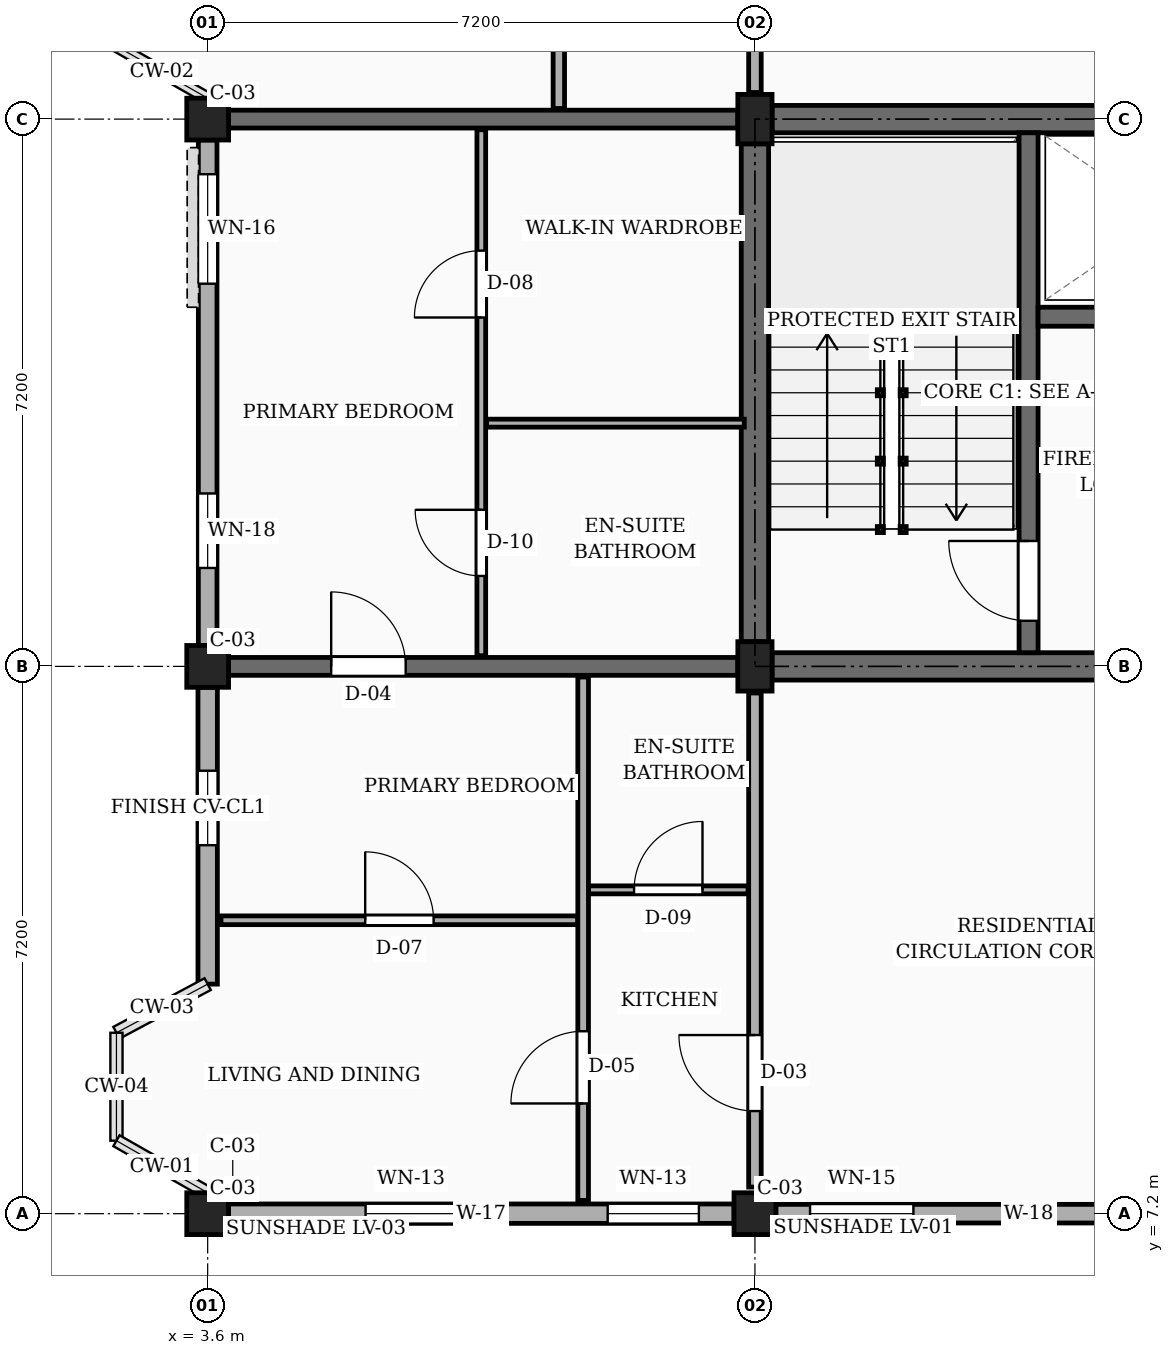
"""IFC4 building model, lengths in metres.
Left out: names, types, materials, properties, quantities, classifications, styles, units other than length and angle.
Written with IfcOpenShell. Run it as: python <this file> out.ifc"""

import sys

from ifc_helpers import new_model, si_unit, direction, frame, frame_2d, origin, origin_2d, place, context, subcontext, project, spatial, rectangle, extrude, element, fill, save


model = new_model("IFC4")
c1 = context("Model", 3, precision=1e-05, world=origin(), true_north=direction((0.0, 1.0)))
c2 = subcontext(c1, "Body", "Model", "MODEL_VIEW")
j1 = project(units=[si_unit("LENGTHUNIT", "METRE"), si_unit("PLANEANGLEUNIT", "RADIAN")], contexts=[c1])
p1 = place(None, origin())
s1 = spatial("IfcSite", under=j1, at=p1, CompositionType="ELEMENT")
p2 = place(p1, origin())
s2 = spatial("IfcBuilding", under=s1, at=p2, CompositionType="ELEMENT")
p3 = place(p2, frame((0.0, 0.0, 17.1)))
s3 = spatial("IfcBuildingStorey", under=s2, at=p3, CompositionType="ELEMENT", Elevation=17.1)
for number, where, z_axis, x_axis in (
    (1, (3.6, 7.2, 0.0), (0.0, 0.0, 1.0), (1.0, 0.0, 0.0)),
    (2, (3.6, 14.4, 0.0), (0.0, 0.0, 1.0), (1.0, 0.0, 0.0)),
    (3, (3.6, 21.6, 0.0), (0.0, 0.0, 1.0), (1.0, 0.0, 0.0)),
    (4, (10.8, 7.2, 0.0), (0.0, 0.0, 1.0), (1.0, 0.0, 0.0)),
):
    element("IfcColumn", number, at=place(p3, frame(where, z_axis=z_axis, x_axis=x_axis)), inside=s3, PredefinedType="COLUMN", context=c2, shape_type="SweptSolid", body=[
        extrude(rectangle(XDim=0.55, YDim=0.55, at=origin_2d()), origin(), (0.0, 0.0, 1.0), 3.15),
    ])
for number, where, z_axis, x_axis in (
    (5, (10.8, 14.4, 0.0), (0.0, 0.0, 1.0), (1.0, 0.0, 0.0)),
    (6, (10.8, 21.6, 0.0), (0.0, 0.0, 1.0), (1.0, 0.0, 0.0)),
):
    element("IfcColumn", number, at=place(p3, frame(where, z_axis=z_axis, x_axis=x_axis)), inside=s3, PredefinedType="COLUMN", context=c2, shape_type="SweptSolid", body=[
        extrude(rectangle(XDim=0.45, YDim=0.65, at=origin_2d()), origin(), (0.0, 0.0, 1.0), 3.15),
    ])
p4 = place(p3, frame((3.875, 14.4, 0.0), z_axis=(0.0, 0.0, 1.0), x_axis=(1.0, 0.0, 0.0)))
e7 = element("IfcWall", 7, at=p4, inside=s3, PredefinedType="SOLIDWALL", context=c2, shape_type="SweptSolid", body=[
    extrude(rectangle(XDim=6.7, YDim=0.235, at=frame_2d((3.35, 0.0))), origin(), (0.0, 0.0, 1.0), 2.17),
])
p5 = place(p4, frame((1.35, 0.0, 0.0)))
e8 = element("IfcOpeningElement", 8, at=p5, cuts=e7, PredefinedType="OPENING", context=c2, shape_type="SweptSolid", body=[
    extrude(rectangle(XDim=0.98, YDim=2.12, at=frame_2d((0.49, 1.06))), frame((0.0, 0.127, 0.0), z_axis=(0.0, -1.0, 0.0), x_axis=(1.0, 0.0, 0.0)), (0.0, 0.0, 1.0), 0.255),
])
p6 = place(p3, frame((3.875, 21.6, 0.0), z_axis=(0.0, 0.0, 1.0), x_axis=(1.0, 0.0, 0.0)))
e9 = element("IfcWall", 9, at=p6, inside=s3, PredefinedType="SOLIDWALL", context=c2, shape_type="SweptSolid", body=[
    extrude(rectangle(XDim=6.7, YDim=0.235, at=frame_2d((3.35, 0.0))), origin(), (0.0, 0.0, 1.0), 2.17),
])
p7 = place(p3, frame((3.875, 7.2, 0.0), z_axis=(0.0, 0.0, 1.0), x_axis=(1.0, 0.0, 0.0)))
e10 = element("IfcWall", 10, at=p7, inside=s3, PredefinedType="SOLIDWALL", context=c2, shape_type="SweptSolid", body=[
    extrude(rectangle(XDim=6.65, YDim=0.255, at=frame_2d((3.325, 0.0))), origin(), (0.0, 0.0, 1.0), 2.44),
])
p8 = place(p7, frame((1.802, 0.0, 0.78)))
e11 = element("IfcOpeningElement", 11, at=p8, cuts=e10, PredefinedType="OPENING", context=c2, shape_type="SweptSolid", body=[
    extrude(rectangle(XDim=1.2, YDim=1.26, at=frame_2d((0.6, 0.63))), frame((0.0, 0.137, 0.0), z_axis=(0.0, -1.0, 0.0), x_axis=(1.0, 0.0, 0.0)), (0.0, 0.0, 1.0), 0.275),
])
p9 = place(p7, frame((4.988, 0.0, 0.78)))
e12 = element("IfcOpeningElement", 12, at=p9, cuts=e10, PredefinedType="OPENING", context=c2, shape_type="SweptSolid", body=[
    extrude(rectangle(XDim=1.2, YDim=1.26, at=frame_2d((0.6, 0.63))), frame((0.0, 0.137, 0.0), z_axis=(0.0, -1.0, 0.0), x_axis=(1.0, 0.0, 0.0)), (0.0, 0.0, 1.0), 0.275),
])
p10 = place(p3, frame((11.075, 7.2, 0.0), z_axis=(0.0, 0.0, 1.0), x_axis=(1.0, 0.0, 0.0)))
e13 = element("IfcWall", 13, at=p10, inside=s3, PredefinedType="SOLIDWALL", context=c2, shape_type="SweptSolid", body=[
    extrude(rectangle(XDim=6.65, YDim=0.245, at=frame_2d((3.325, 0.0))), origin(), (0.0, 0.0, 1.0), 2.44),
])
p11 = place(p10, frame((0.45, 0.0, 0.78)))
e14 = element("IfcOpeningElement", 14, at=p11, cuts=e13, PredefinedType="OPENING", context=c2, shape_type="SweptSolid", body=[
    extrude(rectangle(XDim=1.36, YDim=1.26, at=frame_2d((0.68, 0.63))), frame((0.0, 0.133, 0.0), z_axis=(0.0, -1.0, 0.0), x_axis=(1.0, 0.0, 0.0)), (0.0, 0.0, 1.0), 0.265),
])
p12 = place(p10, frame((4.65, 0.0, 0.78)))
e15 = element("IfcOpeningElement", 15, at=p12, cuts=e13, PredefinedType="OPENING", context=c2, shape_type="SweptSolid", body=[
    extrude(rectangle(XDim=0.9, YDim=1.36, at=frame_2d((0.45, 0.68))), frame((0.0, 0.133, 0.0), z_axis=(0.0, -1.0, 0.0), x_axis=(1.0, 0.0, 0.0)), (0.0, 0.0, 1.0), 0.265),
])
p13 = place(p3, frame((3.6, 21.325, 0.0), z_axis=(0.0, 0.0, 1.0), x_axis=(0.0, -1.0, 0.0)))
e16 = element("IfcWall", 16, at=p13, inside=s3, PredefinedType="SOLIDWALL", context=c2, shape_type="SweptSolid", body=[
    extrude(rectangle(XDim=6.65, YDim=0.245, at=frame_2d((3.325, 0.0))), origin(), (0.0, 0.0, 1.0), 2.44),
])
p14 = place(p13, frame((0.45, 0.0, 0.78)))
e17 = element("IfcOpeningElement", 17, at=p14, cuts=e16, PredefinedType="OPENING", context=c2, shape_type="SweptSolid", body=[
    extrude(rectangle(XDim=1.44, YDim=1.26, at=frame_2d((0.72, 0.63))), frame((0.0, 0.133, 0.0), z_axis=(0.0, -1.0, 0.0), x_axis=(1.0, 0.0, 0.0)), (0.0, 0.0, 1.0), 0.265),
])
p15 = place(p13, frame((4.65, 0.0, 0.78)))
e18 = element("IfcOpeningElement", 18, at=p15, cuts=e16, PredefinedType="OPENING", context=c2, shape_type="SweptSolid", body=[
    extrude(rectangle(XDim=0.98, YDim=1.36, at=frame_2d((0.49, 0.68))), frame((0.0, 0.133, 0.0), z_axis=(0.0, -1.0, 0.0), x_axis=(1.0, 0.0, 0.0)), (0.0, 0.0, 1.0), 0.265),
])
p16 = place(p3, frame((3.6, 14.125, 0.0), z_axis=(0.0, 0.0, 1.0), x_axis=(0.0, -1.0, 0.0)))
e19 = element("IfcWall", 19, at=p16, inside=s3, PredefinedType="SOLIDWALL", context=c2, shape_type="SweptSolid", body=[
    extrude(rectangle(XDim=3.905, YDim=0.255, at=frame_2d((1.953, 0.0))), origin(), (0.0, 0.0, 1.0), 2.44),
])
p17 = place(p16, frame((1.097, 0.0, 0.78)))
e20 = element("IfcOpeningElement", 20, at=p17, cuts=e19, PredefinedType="OPENING", context=c2, shape_type="SweptSolid", body=[
    extrude(rectangle(XDim=0.98, YDim=1.36, at=frame_2d((0.49, 0.68))), frame((0.0, 0.137, 0.0), z_axis=(0.0, -1.0, 0.0), x_axis=(1.0, 0.0, 0.0)), (0.0, 0.0, 1.0), 0.275),
])
p18 = place(p3, frame((10.8, 14.725, 0.0), z_axis=(0.0, 0.0, 1.0), x_axis=(0.0, 1.0, 0.0)))
e21 = element("IfcWall", 21, at=p18, inside=s3, PredefinedType="SHEAR", context=c2, shape_type="SweptSolid", body=[
    extrude(rectangle(XDim=6.55, YDim=0.36, at=frame_2d((3.275, 0.0))), origin(), (0.0, 0.0, 1.0), 2.87),
])
for number, where, z_axis, x_axis in (
    (22, (11.025, 21.6, 0.0), (0.0, 0.0, 1.0), (1.0, 0.0, 0.0)),
    (23, (11.025, 14.4, 0.0), (0.0, 0.0, 1.0), (1.0, 0.0, 0.0)),
):
    element("IfcWall", number, at=place(p3, frame(where, z_axis=z_axis, x_axis=x_axis)), inside=s3, PredefinedType="SHEAR", context=c2, shape_type="SweptSolid", body=[
        extrude(rectangle(XDim=6.75, YDim=0.36, at=frame_2d((3.375, 0.0))), origin(), (0.0, 0.0, 1.0), 2.87),
    ])
p19 = place(p3, frame((14.4, 14.58, 0.0), z_axis=(0.0, 0.0, 1.0), x_axis=(0.0, 1.0, 0.0)))
e24 = element("IfcWall", 24, at=p19, inside=s3, PredefinedType="SHEAR", context=c2, shape_type="SweptSolid", body=[
    extrude(rectangle(XDim=6.84, YDim=0.25, at=frame_2d((3.42, 0.0))), origin(), (0.0, 0.0, 1.0), 2.87),
])
p20 = place(p19, frame((0.42, 0.0, 0.0)))
e25 = element("IfcOpeningElement", 25, at=p20, cuts=e24, PredefinedType="OPENING", context=c2, shape_type="SweptSolid", body=[
    extrude(rectangle(XDim=1.05, YDim=2.15, at=frame_2d((0.525, 1.075))), frame((0.0, 0.135, 0.0), z_axis=(0.0, -1.0, 0.0), x_axis=(1.0, 0.0, 0.0)), (0.0, 0.0, 1.0), 0.27),
])
p21 = place(p3, frame((14.525, 19.0, 0.0), z_axis=(0.0, 0.0, 1.0), x_axis=(1.0, 0.0, 0.0)))
e26 = element("IfcWall", 26, at=p21, inside=s3, PredefinedType="SHEAR", context=c2, shape_type="SweptSolid", body=[
    extrude(rectangle(XDim=3.295, YDim=0.25, at=frame_2d((1.647, 0.0))), origin(), (0.0, 0.0, 1.0), 2.87),
])
p22 = place(p21, frame((1.1, 0.0, 0.0)))
e27 = element("IfcOpeningElement", 27, at=p22, cuts=e26, PredefinedType="OPENING", context=c2, shape_type="SweptSolid", body=[
    extrude(rectangle(XDim=1.1, YDim=2.2, at=frame_2d((0.55, 1.1))), frame((0.0, 0.135, 0.0), z_axis=(0.0, -1.0, 0.0), x_axis=(1.0, 0.0, 0.0)), (0.0, 0.0, 1.0), 0.27),
])
p23 = place(p3, frame((10.8, 7.55, 0.0), z_axis=(0.0, 0.0, 1.0), x_axis=(0.0, 1.0, 0.0)))
e28 = element("IfcWall", 28, at=p23, inside=s3, PredefinedType="PARTITIONING", context=c2, shape_type="SweptSolid", body=[
    extrude(rectangle(XDim=6.5, YDim=0.165, at=frame_2d((3.25, 0.0))), origin(), (0.0, 0.0, 1.0), 2.305),
])
p24 = place(p23, frame((1.0, 0.0, 0.0)))
e29 = element("IfcOpeningElement", 29, at=p24, cuts=e28, PredefinedType="OPENING", context=c2, shape_type="SweptSolid", body=[
    extrude(rectangle(XDim=1.0, YDim=2.15, at=frame_2d((0.5, 1.075))), frame((0.0, 0.093, 0.0), z_axis=(0.0, -1.0, 0.0), x_axis=(1.0, 0.0, 0.0)), (0.0, 0.0, 1.0), 0.185),
])
p25 = place(p3, frame((10.8, 21.95, 0.0), z_axis=(0.0, 0.0, 1.0), x_axis=(0.0, 1.0, 0.0)))
e30 = element("IfcWall", 30, at=p25, inside=s3, PredefinedType="PARTITIONING", context=c2, shape_type="SweptSolid", body=[
    extrude(rectangle(XDim=6.5, YDim=0.165, at=frame_2d((3.25, 0.0))), origin(), (0.0, 0.0, 1.0), 2.305),
])
p26 = place(p25, frame((1.0, 0.0, 0.0)))
e31 = element("IfcOpeningElement", 31, at=p26, cuts=e30, PredefinedType="OPENING", context=c2, shape_type="SweptSolid", body=[
    extrude(rectangle(XDim=0.94, YDim=2.12, at=frame_2d((0.47, 1.06))), frame((0.0, 0.093, 0.0), z_axis=(0.0, -1.0, 0.0), x_axis=(1.0, 0.0, 0.0)), (0.0, 0.0, 1.0), 0.185),
])
p27 = place(p3, frame((3.775, 11.06, 0.0), z_axis=(0.0, 0.0, 1.0), x_axis=(1.0, 0.0, 0.0)))
e32 = element("IfcWall", 32, at=p27, inside=s3, PredefinedType="PARTITIONING", context=c2, shape_type="SweptSolid", body=[
    extrude(rectangle(XDim=4.695, YDim=0.115, at=frame_2d((2.348, 0.0))), origin(), (0.0, 0.0, 1.0), 2.305),
])
p28 = place(p27, frame((1.897, 0.0, 0.0)))
e33 = element("IfcOpeningElement", 33, at=p28, cuts=e32, PredefinedType="OPENING", context=c2, shape_type="SweptSolid", body=[
    extrude(rectangle(XDim=0.9, YDim=2.1, at=frame_2d((0.45, 1.05))), frame((0.0, 0.067, 0.0), z_axis=(0.0, -1.0, 0.0), x_axis=(1.0, 0.0, 0.0)), (0.0, 0.0, 1.0), 0.135),
])
p29 = place(p3, frame((8.61, 11.46, 0.0), z_axis=(0.0, 0.0, 1.0), x_axis=(1.0, 0.0, 0.0)))
e34 = element("IfcWall", 34, at=p29, inside=s3, PredefinedType="PARTITIONING", context=c2, shape_type="SweptSolid", body=[
    extrude(rectangle(XDim=2.1, YDim=0.105, at=frame_2d((1.05, 0.0))), origin(), (0.0, 0.0, 1.0), 2.305),
])
p30 = place(p29, frame((0.6, 0.0, 0.0)))
e35 = element("IfcOpeningElement", 35, at=p30, cuts=e34, PredefinedType="OPENING", context=c2, shape_type="SweptSolid", body=[
    extrude(rectangle(XDim=0.9, YDim=2.05, at=frame_2d((0.45, 1.025))), frame((0.0, 0.062, 0.0), z_axis=(0.0, -1.0, 0.0), x_axis=(1.0, 0.0, 0.0)), (0.0, 0.0, 1.0), 0.125),
])
p31 = place(p3, frame((8.54, 7.375, 0.0), z_axis=(0.0, 0.0, 1.0), x_axis=(0.0, 1.0, 0.0)))
e36 = element("IfcWall", 36, at=p31, inside=s3, PredefinedType="PARTITIONING", context=c2, shape_type="SweptSolid", body=[
    extrude(rectangle(XDim=6.885, YDim=0.14, at=frame_2d((3.442, 0.0))), origin(), (0.0, 0.0, 1.0), 2.305),
])
p32 = place(p31, frame((1.275, 0.0, 0.0)))
e37 = element("IfcOpeningElement", 37, at=p32, cuts=e36, PredefinedType="OPENING", context=c2, shape_type="SweptSolid", body=[
    extrude(rectangle(XDim=0.95, YDim=2.1, at=frame_2d((0.475, 1.05))), frame((0.0, 0.08, 0.0), z_axis=(0.0, -1.0, 0.0), x_axis=(1.0, 0.0, 0.0)), (0.0, 0.0, 1.0), 0.16),
])
p33 = place(p3, frame((7.2, 14.54, 0.0), z_axis=(0.0, 0.0, 1.0), x_axis=(0.0, 1.0, 0.0)))
e38 = element("IfcWall", 38, at=p33, inside=s3, PredefinedType="PARTITIONING", context=c2, shape_type="SweptSolid", body=[
    extrude(rectangle(XDim=6.92, YDim=0.115, at=frame_2d((3.46, 0.0))), origin(), (0.0, 0.0, 1.0), 2.305),
])
p34 = place(p33, frame((1.05, 0.0, 0.0)))
e39 = element("IfcOpeningElement", 39, at=p34, cuts=e38, PredefinedType="OPENING", context=c2, shape_type="SweptSolid", body=[
    extrude(rectangle(XDim=0.87, YDim=2.05, at=frame_2d((0.435, 1.025))), frame((0.0, 0.067, 0.0), z_axis=(0.0, -1.0, 0.0), x_axis=(1.0, 0.0, 0.0)), (0.0, 0.0, 1.0), 0.135),
])
p35 = place(p33, frame((4.45, 0.0, 0.0)))
e40 = element("IfcOpeningElement", 40, at=p35, cuts=e38, PredefinedType="OPENING", context=c2, shape_type="SweptSolid", body=[
    extrude(rectangle(XDim=0.88, YDim=2.08, at=frame_2d((0.44, 1.04))), frame((0.0, 0.067, 0.0), z_axis=(0.0, -1.0, 0.0), x_axis=(1.0, 0.0, 0.0)), (0.0, 0.0, 1.0), 0.135),
])
p36 = place(p3, frame((7.27, 17.6, 0.0), z_axis=(0.0, 0.0, 1.0), x_axis=(1.0, 0.0, 0.0)))
e41 = element("IfcWall", 41, at=p36, inside=s3, PredefinedType="PARTITIONING", context=c2, shape_type="SweptSolid", body=[
    extrude(rectangle(XDim=3.39, YDim=0.105, at=frame_2d((1.695, 0.0))), origin(), (0.0, 0.0, 1.0), 2.305),
])
p37 = place(p3, frame((8.22, 21.74, 0.0), z_axis=(0.0, 0.0, 1.0), x_axis=(0.0, 1.0, 0.0)))
e42 = element("IfcWall", 42, at=p37, inside=s3, PredefinedType="PARTITIONING", context=c2, shape_type="SweptSolid", body=[
    extrude(rectangle(XDim=6.92, YDim=0.15, at=frame_2d((3.46, 0.0))), origin(), (0.0, 0.0, 1.0), 2.305),
])
p38 = place(p37, frame((1.31, 0.0, 0.0)))
e43 = element("IfcOpeningElement", 43, at=p38, cuts=e42, PredefinedType="OPENING", context=c2, shape_type="SweptSolid", body=[
    extrude(rectangle(XDim=0.95, YDim=2.1, at=frame_2d((0.475, 1.05))), frame((0.0, 0.085, 0.0), z_axis=(0.0, -1.0, 0.0), x_axis=(1.0, 0.0, 0.0)), (0.0, 0.0, 1.0), 0.17),
])
p39 = place(p8, origin())
e44 = element("IfcWindow", 44, at=p39, inside=s3, PartitioningType="SINGLE_PANEL", PredefinedType="WINDOW", context=c2, shape_type="SweptSolid", body=[
    extrude(rectangle(XDim=1.2, YDim=1.26, at=frame_2d((0.6, 0.63))), frame((0.0, 0.03, 0.0), z_axis=(0.0, -1.0, 0.0), x_axis=(1.0, 0.0, 0.0)), (0.0, 0.0, 1.0), 0.06),
])
fill(e11, e44)
p40 = place(p9, origin())
e45 = element("IfcWindow", 45, at=p40, inside=s3, PartitioningType="SINGLE_PANEL", PredefinedType="WINDOW", context=c2, shape_type="SweptSolid", body=[
    extrude(rectangle(XDim=1.2, YDim=1.26, at=frame_2d((0.6, 0.63))), frame((0.0, 0.03, 0.0), z_axis=(0.0, -1.0, 0.0), x_axis=(1.0, 0.0, 0.0)), (0.0, 0.0, 1.0), 0.06),
])
fill(e12, e45)
p41 = place(p11, origin())
e46 = element("IfcWindow", 46, at=p41, inside=s3, PartitioningType="SINGLE_PANEL", PredefinedType="WINDOW", context=c2, shape_type="SweptSolid", body=[
    extrude(rectangle(XDim=1.36, YDim=1.26, at=frame_2d((0.68, 0.63))), frame((0.0, 0.03, 0.0), z_axis=(0.0, -1.0, 0.0), x_axis=(1.0, 0.0, 0.0)), (0.0, 0.0, 1.0), 0.06),
])
fill(e14, e46)
p42 = place(p14, origin())
e47 = element("IfcWindow", 47, at=p42, inside=s3, PartitioningType="SINGLE_PANEL", PredefinedType="WINDOW", context=c2, shape_type="SweptSolid", body=[
    extrude(rectangle(XDim=1.44, YDim=1.26, at=frame_2d((0.72, 0.63))), frame((0.0, 0.03, 0.0), z_axis=(0.0, -1.0, 0.0), x_axis=(1.0, 0.0, 0.0)), (0.0, 0.0, 1.0), 0.06),
])
fill(e17, e47)
p43 = place(p15, origin())
e48 = element("IfcWindow", 48, at=p43, inside=s3, PartitioningType="SINGLE_PANEL", PredefinedType="WINDOW", context=c2, shape_type="SweptSolid", body=[
    extrude(rectangle(XDim=0.98, YDim=1.36, at=frame_2d((0.49, 0.68))), frame((0.0, 0.03, 0.0), z_axis=(0.0, -1.0, 0.0), x_axis=(1.0, 0.0, 0.0)), (0.0, 0.0, 1.0), 0.06),
])
fill(e18, e48)
p44 = place(p17, origin())
e49 = element("IfcWindow", 49, at=p44, inside=s3, PartitioningType="SINGLE_PANEL", PredefinedType="WINDOW", context=c2, shape_type="SweptSolid", body=[
    extrude(rectangle(XDim=0.98, YDim=1.36, at=frame_2d((0.49, 0.68))), frame((0.0, 0.03, 0.0), z_axis=(0.0, -1.0, 0.0), x_axis=(1.0, 0.0, 0.0)), (0.0, 0.0, 1.0), 0.06),
])
fill(e20, e49)
p45 = place(p20, origin())
e50 = element("IfcDoor", 50, at=p45, inside=s3, OperationType="SINGLE_SWING_RIGHT", PredefinedType="DOOR", context=c2, shape_type="SweptSolid", body=[
    extrude(rectangle(XDim=1.05, YDim=2.15, at=frame_2d((0.525, 1.075))), frame((0.0, 0.025, 0.0), z_axis=(0.0, -1.0, 0.0), x_axis=(1.0, 0.0, 0.0)), (0.0, 0.0, 1.0), 0.05),
])
fill(e25, e50)
p46 = place(p24, origin())
e51 = element("IfcDoor", 51, at=p46, inside=s3, OperationType="SINGLE_SWING_RIGHT", PredefinedType="DOOR", context=c2, shape_type="SweptSolid", body=[
    extrude(rectangle(XDim=1.0, YDim=2.15, at=frame_2d((0.5, 1.075))), frame((0.0, 0.025, 0.0), z_axis=(0.0, -1.0, 0.0), x_axis=(1.0, 0.0, 0.0)), (0.0, 0.0, 1.0), 0.05),
])
fill(e29, e51)
p47 = place(p28, origin())
e52 = element("IfcDoor", 52, at=p47, inside=s3, OperationType="SINGLE_SWING_LEFT", PredefinedType="DOOR", context=c2, shape_type="SweptSolid", body=[
    extrude(rectangle(XDim=0.9, YDim=2.1, at=frame_2d((0.45, 1.05))), frame((0.0, 0.025, 0.0), z_axis=(0.0, -1.0, 0.0), x_axis=(1.0, 0.0, 0.0)), (0.0, 0.0, 1.0), 0.05),
])
fill(e33, e52)
p48 = place(p30, origin())
e53 = element("IfcDoor", 53, at=p48, inside=s3, OperationType="SINGLE_SWING_RIGHT", PredefinedType="DOOR", context=c2, shape_type="SweptSolid", body=[
    extrude(rectangle(XDim=0.9, YDim=2.05, at=frame_2d((0.45, 1.025))), frame((0.0, 0.025, 0.0), z_axis=(0.0, -1.0, 0.0), x_axis=(1.0, 0.0, 0.0)), (0.0, 0.0, 1.0), 0.05),
])
fill(e35, e53)
p49 = place(p32, origin())
e54 = element("IfcDoor", 54, at=p49, inside=s3, OperationType="SINGLE_SWING_LEFT", PredefinedType="DOOR", context=c2, shape_type="SweptSolid", body=[
    extrude(rectangle(XDim=0.95, YDim=2.1, at=frame_2d((0.475, 1.05))), frame((0.0, 0.025, 0.0), z_axis=(0.0, -1.0, 0.0), x_axis=(1.0, 0.0, 0.0)), (0.0, 0.0, 1.0), 0.05),
])
fill(e37, e54)
p50 = place(p34, origin())
e55 = element("IfcDoor", 55, at=p50, inside=s3, OperationType="SINGLE_SWING_RIGHT", PredefinedType="DOOR", context=c2, shape_type="SweptSolid", body=[
    extrude(rectangle(XDim=0.87, YDim=2.05, at=frame_2d((0.435, 1.025))), frame((0.0, 0.025, 0.0), z_axis=(0.0, -1.0, 0.0), x_axis=(1.0, 0.0, 0.0)), (0.0, 0.0, 1.0), 0.05),
])
fill(e39, e55)
p51 = place(p35, origin())
e56 = element("IfcDoor", 56, at=p51, inside=s3, OperationType="SINGLE_SWING_LEFT", PredefinedType="DOOR", context=c2, shape_type="SweptSolid", body=[
    extrude(rectangle(XDim=0.88, YDim=2.08, at=frame_2d((0.44, 1.04))), frame((0.0, 0.025, 0.0), z_axis=(0.0, -1.0, 0.0), x_axis=(1.0, 0.0, 0.0)), (0.0, 0.0, 1.0), 0.05),
])
fill(e40, e56)
p52 = place(p5, origin())
e57 = element("IfcDoor", 57, at=p52, inside=s3, OperationType="SINGLE_SWING_LEFT", PredefinedType="DOOR", context=c2, shape_type="SweptSolid", body=[
    extrude(rectangle(XDim=0.98, YDim=2.12, at=frame_2d((0.49, 1.06))), frame((0.0, 0.025, 0.0), z_axis=(0.0, -1.0, 0.0), x_axis=(1.0, 0.0, 0.0)), (0.0, 0.0, 1.0), 0.05),
])
fill(e8, e57)
save(model, sys.argv[1])
